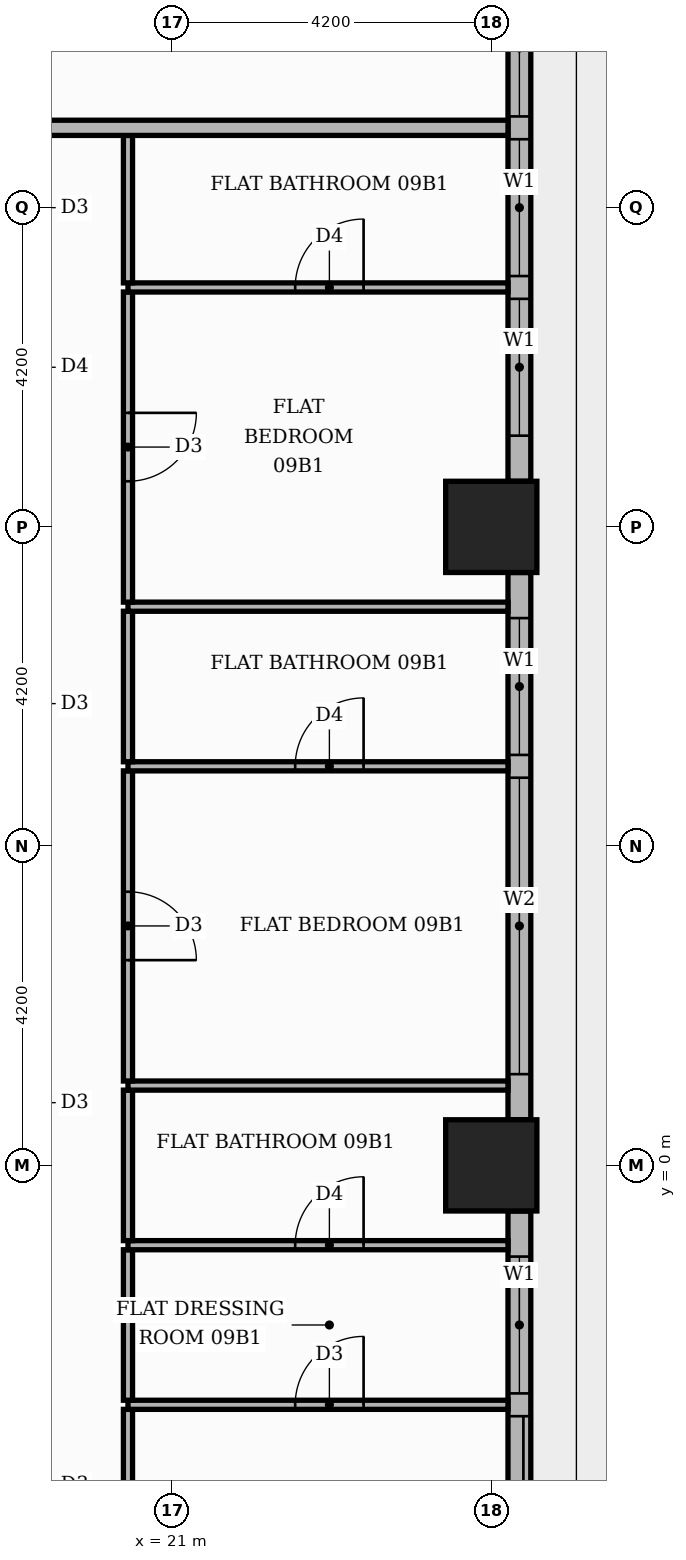
"""IFC4 building model, lengths in metres.
Left out: names, types, materials, properties, quantities, classifications, styles, units other than length and angle.
Written with IfcOpenShell. Run it as: python <this file> out.ifc"""

import sys

from ifc_helpers import new_model, si_unit, direction, frame, frame_2d, origin, origin_2d, place, context, subcontext, project, spatial, rectangle, extrude, element, fill, save


model = new_model("IFC4")
c1 = context("Model", 3, precision=1e-05, world=origin(), true_north=direction((0.0, 1.0)))
c2 = subcontext(c1, "Body", "Model", "MODEL_VIEW")
j1 = project(units=[si_unit("LENGTHUNIT", "METRE"), si_unit("PLANEANGLEUNIT", "RADIAN")], contexts=[c1])
p1 = place(None, origin())
s1 = spatial("IfcSite", under=j1, at=p1, CompositionType="ELEMENT")
p2 = place(p1, origin())
s2 = spatial("IfcBuilding", under=s1, at=p2, CompositionType="ELEMENT")
p3 = place(p2, frame((0.0, 0.0, 42.6)))
s3 = spatial("IfcBuildingStorey", under=s2, at=p3, CompositionType="ELEMENT", Elevation=42.6)
for number, where, z_axis, x_axis in (
    (1, (25.2, 0.0, 0.0), (0.0, 0.0, 1.0), (1.0, 0.0, 0.0)),
    (2, (25.2, 8.4, 0.0), (0.0, 0.0, 1.0), (1.0, 0.0, 0.0)),
):
    element("IfcColumn", number, at=place(p3, frame(where, z_axis=z_axis, x_axis=x_axis)), inside=s3, PredefinedType="COLUMN", context=c2, shape_type="SweptSolid", body=[
        extrude(rectangle(XDim=1.2, YDim=1.2, at=origin_2d()), origin(), (0.0, 0.0, 1.0), 3.9),
    ])
p4 = place(p3, frame((25.57, -7.8, 0.0), z_axis=(0.0, 0.0, 1.0), x_axis=(0.0, 1.0, 0.0)))
e3 = element("IfcWall", 3, at=p4, inside=s3, PredefinedType="STANDARD", context=c2, shape_type="SweptSolid", body=[
    extrude(rectangle(XDim=7.2, YDim=0.3, at=frame_2d((3.6, 0.0))), origin(), (0.0, 0.0, 1.0), 3.48),
])
p5 = place(p4, frame((0.6, 0.0, 0.0)))
e4 = element("IfcOpeningElement", 4, at=p5, cuts=e3, PredefinedType="OPENING", context=c2, shape_type="SweptSolid", body=[
    extrude(rectangle(XDim=3.9, YDim=2.4, at=frame_2d((1.95, 1.2))), frame((0.0, 0.16, 0.0), z_axis=(0.0, -1.0, 0.0), x_axis=(1.0, 0.0, 0.0)), (0.0, 0.0, 1.0), 0.32),
])
p6 = place(p4, frame((4.8, 0.0, 0.9)))
e5 = element("IfcOpeningElement", 5, at=p6, cuts=e3, PredefinedType="OPENING", context=c2, shape_type="SweptSolid", body=[
    extrude(rectangle(XDim=1.8, YDim=2.1, at=frame_2d((0.9, 1.05))), frame((0.0, 0.16, 0.0), z_axis=(0.0, -1.0, 0.0), x_axis=(1.0, 0.0, 0.0)), (0.0, 0.0, 1.0), 0.32),
])
p7 = place(p3, frame((25.57, 0.6, 0.0), z_axis=(0.0, 0.0, 1.0), x_axis=(0.0, 1.0, 0.0)))
e6 = element("IfcWall", 6, at=p7, inside=s3, PredefinedType="STANDARD", context=c2, shape_type="SweptSolid", body=[
    extrude(rectangle(XDim=7.2, YDim=0.3, at=frame_2d((3.6, 0.0))), origin(), (0.0, 0.0, 1.0), 3.48),
])
p8 = place(p7, frame((0.6, 0.0, 0.9)))
e7 = element("IfcOpeningElement", 7, at=p8, cuts=e6, PredefinedType="OPENING", context=c2, shape_type="SweptSolid", body=[
    extrude(rectangle(XDim=3.9, YDim=2.1, at=frame_2d((1.95, 1.05))), frame((0.0, 0.16, 0.0), z_axis=(0.0, -1.0, 0.0), x_axis=(1.0, 0.0, 0.0)), (0.0, 0.0, 1.0), 0.32),
])
p9 = place(p7, frame((4.8, 0.0, 0.9)))
e8 = element("IfcOpeningElement", 8, at=p9, cuts=e6, PredefinedType="OPENING", context=c2, shape_type="SweptSolid", body=[
    extrude(rectangle(XDim=1.8, YDim=2.1, at=frame_2d((0.9, 1.05))), frame((0.0, 0.16, 0.0), z_axis=(0.0, -1.0, 0.0), x_axis=(1.0, 0.0, 0.0)), (0.0, 0.0, 1.0), 0.32),
])
p10 = place(p3, frame((25.57, 9.0, 0.0), z_axis=(0.0, 0.0, 1.0), x_axis=(0.0, 1.0, 0.0)))
e9 = element("IfcWall", 9, at=p10, inside=s3, PredefinedType="STANDARD", context=c2, shape_type="SweptSolid", body=[
    extrude(rectangle(XDim=7.2, YDim=0.3, at=frame_2d((3.6, 0.0))), origin(), (0.0, 0.0, 1.0), 3.48),
])
p11 = place(p10, frame((0.6, 0.0, 0.9)))
e10 = element("IfcOpeningElement", 10, at=p11, cuts=e9, PredefinedType="OPENING", context=c2, shape_type="SweptSolid", body=[
    extrude(rectangle(XDim=1.8, YDim=2.1, at=frame_2d((0.9, 1.05))), frame((0.0, 0.16, 0.0), z_axis=(0.0, -1.0, 0.0), x_axis=(1.0, 0.0, 0.0)), (0.0, 0.0, 1.0), 0.32),
])
p12 = place(p10, frame((2.7, 0.0, 0.9)))
e11 = element("IfcOpeningElement", 11, at=p12, cuts=e9, PredefinedType="OPENING", context=c2, shape_type="SweptSolid", body=[
    extrude(rectangle(XDim=1.8, YDim=2.1, at=frame_2d((0.9, 1.05))), frame((0.0, 0.16, 0.0), z_axis=(0.0, -1.0, 0.0), x_axis=(1.0, 0.0, 0.0)), (0.0, 0.0, 1.0), 0.32),
])
p13 = place(p10, frame((4.8, 0.0, 0.9)))
e12 = element("IfcOpeningElement", 12, at=p13, cuts=e9, PredefinedType="OPENING", context=c2, shape_type="SweptSolid", body=[
    extrude(rectangle(XDim=1.8, YDim=2.1, at=frame_2d((0.9, 1.05))), frame((0.0, 0.16, 0.0), z_axis=(0.0, -1.0, 0.0), x_axis=(1.0, 0.0, 0.0)), (0.0, 0.0, 1.0), 0.32),
])
p14 = place(p3, frame((20.42, -11.49, 0.0), z_axis=(0.0, 0.0, 1.0), x_axis=(0.0, 1.0, 0.0)))
e13 = element("IfcWall", 13, at=p14, inside=s3, PredefinedType="PARTITIONING", context=c2, shape_type="SweptSolid", body=[
    extrude(rectangle(XDim=8.28, YDim=0.12, at=frame_2d((4.14, 0.0))), origin(), (0.0, 0.0, 1.0), 3.48),
])
p15 = place(p14, frame((3.69, 0.0, 0.0)))
e14 = element("IfcOpeningElement", 14, at=p15, cuts=e13, PredefinedType="OPENING", context=c2, shape_type="SweptSolid", body=[
    extrude(rectangle(XDim=0.9, YDim=2.1, at=frame_2d((0.45, 1.05))), frame((0.0, 0.07, 0.0), z_axis=(0.0, -1.0, 0.0), x_axis=(1.0, 0.0, 0.0)), (0.0, 0.0, 1.0), 0.14),
])
p16 = place(p3, frame((20.42, -3.15, 0.0), z_axis=(0.0, 0.0, 1.0), x_axis=(1.0, 0.0, 0.0)))
e15 = element("IfcWall", 15, at=p16, inside=s3, PredefinedType="PARTITIONING", context=c2, shape_type="SweptSolid", body=[
    extrude(rectangle(XDim=5.0, YDim=0.12, at=frame_2d((2.5, 0.0))), origin(), (0.0, 0.0, 1.0), 3.48),
])
p17 = place(p16, frame((2.2, 0.0, 0.0)))
e16 = element("IfcOpeningElement", 16, at=p17, cuts=e15, PredefinedType="OPENING", context=c2, shape_type="SweptSolid", body=[
    extrude(rectangle(XDim=0.9, YDim=2.1, at=frame_2d((0.45, 1.05))), frame((0.0, 0.07, 0.0), z_axis=(0.0, -1.0, 0.0), x_axis=(1.0, 0.0, 0.0)), (0.0, 0.0, 1.0), 0.14),
])
p18 = place(p3, frame((20.42, -3.09, 0.0), z_axis=(0.0, 0.0, 1.0), x_axis=(0.0, 1.0, 0.0)))
e17 = element("IfcWall", 17, at=p18, inside=s3, PredefinedType="PARTITIONING", context=c2, shape_type="SweptSolid", body=[
    extrude(rectangle(XDim=1.98, YDim=0.12, at=frame_2d((0.99, 0.0))), origin(), (0.0, 0.0, 1.0), 3.48),
])
p19 = place(p3, frame((20.42, -1.05, 0.0), z_axis=(0.0, 0.0, 1.0), x_axis=(1.0, 0.0, 0.0)))
e18 = element("IfcWall", 18, at=p19, inside=s3, PredefinedType="PARTITIONING", context=c2, shape_type="SweptSolid", body=[
    extrude(rectangle(XDim=5.0, YDim=0.12, at=frame_2d((2.5, 0.0))), origin(), (0.0, 0.0, 1.0), 3.48),
])
p20 = place(p19, frame((2.2, 0.0, 0.0)))
e19 = element("IfcOpeningElement", 19, at=p20, cuts=e18, PredefinedType="OPENING", context=c2, shape_type="SweptSolid", body=[
    extrude(rectangle(XDim=0.9, YDim=2.1, at=frame_2d((0.45, 1.05))), frame((0.0, 0.07, 0.0), z_axis=(0.0, -1.0, 0.0), x_axis=(1.0, 0.0, 0.0)), (0.0, 0.0, 1.0), 0.14),
])
p21 = place(p3, frame((20.42, -0.99, 0.0), z_axis=(0.0, 0.0, 1.0), x_axis=(0.0, 1.0, 0.0)))
e20 = element("IfcWall", 20, at=p21, inside=s3, PredefinedType="PARTITIONING", context=c2, shape_type="SweptSolid", body=[
    extrude(rectangle(XDim=1.98, YDim=0.12, at=frame_2d((0.99, 0.0))), origin(), (0.0, 0.0, 1.0), 3.48),
])
p22 = place(p3, frame((20.42, 1.05, 0.0), z_axis=(0.0, 0.0, 1.0), x_axis=(1.0, 0.0, 0.0)))
e21 = element("IfcWall", 21, at=p22, inside=s3, PredefinedType="PARTITIONING", context=c2, shape_type="SweptSolid", body=[
    extrude(rectangle(XDim=5.0, YDim=0.12, at=frame_2d((2.5, 0.0))), origin(), (0.0, 0.0, 1.0), 3.48),
])
p23 = place(p3, frame((20.42, 1.11, 0.0), z_axis=(0.0, 0.0, 1.0), x_axis=(0.0, 1.0, 0.0)))
e22 = element("IfcWall", 22, at=p23, inside=s3, PredefinedType="PARTITIONING", context=c2, shape_type="SweptSolid", body=[
    extrude(rectangle(XDim=4.08, YDim=0.12, at=frame_2d((2.04, 0.0))), origin(), (0.0, 0.0, 1.0), 3.48),
])
p24 = place(p23, frame((1.59, 0.0, 0.0)))
e23 = element("IfcOpeningElement", 23, at=p24, cuts=e22, PredefinedType="OPENING", context=c2, shape_type="SweptSolid", body=[
    extrude(rectangle(XDim=0.9, YDim=2.1, at=frame_2d((0.45, 1.05))), frame((0.0, 0.07, 0.0), z_axis=(0.0, -1.0, 0.0), x_axis=(1.0, 0.0, 0.0)), (0.0, 0.0, 1.0), 0.14),
])
p25 = place(p3, frame((20.42, 5.25, 0.0), z_axis=(0.0, 0.0, 1.0), x_axis=(1.0, 0.0, 0.0)))
e24 = element("IfcWall", 24, at=p25, inside=s3, PredefinedType="PARTITIONING", context=c2, shape_type="SweptSolid", body=[
    extrude(rectangle(XDim=5.0, YDim=0.12, at=frame_2d((2.5, 0.0))), origin(), (0.0, 0.0, 1.0), 3.48),
])
p26 = place(p25, frame((2.2, 0.0, 0.0)))
e25 = element("IfcOpeningElement", 25, at=p26, cuts=e24, PredefinedType="OPENING", context=c2, shape_type="SweptSolid", body=[
    extrude(rectangle(XDim=0.9, YDim=2.1, at=frame_2d((0.45, 1.05))), frame((0.0, 0.07, 0.0), z_axis=(0.0, -1.0, 0.0), x_axis=(1.0, 0.0, 0.0)), (0.0, 0.0, 1.0), 0.14),
])
p27 = place(p3, frame((20.42, 5.31, 0.0), z_axis=(0.0, 0.0, 1.0), x_axis=(0.0, 1.0, 0.0)))
e26 = element("IfcWall", 26, at=p27, inside=s3, PredefinedType="PARTITIONING", context=c2, shape_type="SweptSolid", body=[
    extrude(rectangle(XDim=1.98, YDim=0.12, at=frame_2d((0.99, 0.0))), origin(), (0.0, 0.0, 1.0), 3.48),
])
p28 = place(p3, frame((20.42, 7.35, 0.0), z_axis=(0.0, 0.0, 1.0), x_axis=(1.0, 0.0, 0.0)))
e27 = element("IfcWall", 27, at=p28, inside=s3, PredefinedType="PARTITIONING", context=c2, shape_type="SweptSolid", body=[
    extrude(rectangle(XDim=5.0, YDim=0.12, at=frame_2d((2.5, 0.0))), origin(), (0.0, 0.0, 1.0), 3.48),
])
p29 = place(p3, frame((20.42, 7.41, 0.0), z_axis=(0.0, 0.0, 1.0), x_axis=(0.0, 1.0, 0.0)))
e28 = element("IfcWall", 28, at=p29, inside=s3, PredefinedType="PARTITIONING", context=c2, shape_type="SweptSolid", body=[
    extrude(rectangle(XDim=4.08, YDim=0.12, at=frame_2d((2.04, 0.0))), origin(), (0.0, 0.0, 1.0), 3.48),
])
p30 = place(p29, frame((1.59, 0.0, 0.0)))
e29 = element("IfcOpeningElement", 29, at=p30, cuts=e28, PredefinedType="OPENING", context=c2, shape_type="SweptSolid", body=[
    extrude(rectangle(XDim=0.9, YDim=2.1, at=frame_2d((0.45, 1.05))), frame((0.0, 0.07, 0.0), z_axis=(0.0, -1.0, 0.0), x_axis=(1.0, 0.0, 0.0)), (0.0, 0.0, 1.0), 0.14),
])
p31 = place(p3, frame((20.42, 11.55, 0.0), z_axis=(0.0, 0.0, 1.0), x_axis=(1.0, 0.0, 0.0)))
e30 = element("IfcWall", 30, at=p31, inside=s3, PredefinedType="PARTITIONING", context=c2, shape_type="SweptSolid", body=[
    extrude(rectangle(XDim=5.0, YDim=0.12, at=frame_2d((2.5, 0.0))), origin(), (0.0, 0.0, 1.0), 3.48),
])
p32 = place(p31, frame((2.2, 0.0, 0.0)))
e31 = element("IfcOpeningElement", 31, at=p32, cuts=e30, PredefinedType="OPENING", context=c2, shape_type="SweptSolid", body=[
    extrude(rectangle(XDim=0.9, YDim=2.1, at=frame_2d((0.45, 1.05))), frame((0.0, 0.07, 0.0), z_axis=(0.0, -1.0, 0.0), x_axis=(1.0, 0.0, 0.0)), (0.0, 0.0, 1.0), 0.14),
])
p33 = place(p3, frame((20.42, 11.61, 0.0), z_axis=(0.0, 0.0, 1.0), x_axis=(0.0, 1.0, 0.0)))
e32 = element("IfcWall", 32, at=p33, inside=s3, PredefinedType="PARTITIONING", context=c2, shape_type="SweptSolid", body=[
    extrude(rectangle(XDim=1.94, YDim=0.12, at=frame_2d((0.97, 0.0))), origin(), (0.0, 0.0, 1.0), 3.48),
])
p34 = place(p3, frame((-13.65, 13.65, 0.0), z_axis=(0.0, 0.0, 1.0), x_axis=(1.0, 0.0, 0.0)))
e33 = element("IfcWall", 33, at=p34, inside=s3, PredefinedType="PARTITIONING", context=c2, shape_type="SweptSolid", body=[
    extrude(rectangle(XDim=39.07, YDim=0.2, at=frame_2d((19.535, 0.0))), origin(), (0.0, 0.0, 1.0), 3.48),
])
p35 = place(p34, frame((24.65, 0.0, 0.0)))
e34 = element("IfcOpeningElement", 34, at=p35, cuts=e33, PredefinedType="OPENING", context=c2, shape_type="SweptSolid", body=[
    extrude(rectangle(XDim=1.1, YDim=2.4, at=frame_2d((0.55, 1.2))), frame((0.0, 0.11, 0.0), z_axis=(0.0, -1.0, 0.0), x_axis=(1.0, 0.0, 0.0)), (0.0, 0.0, 1.0), 0.22),
])
p36 = place(p34, frame((14.15, 0.0, 0.0)))
e35 = element("IfcOpeningElement", 35, at=p36, cuts=e33, PredefinedType="OPENING", context=c2, shape_type="SweptSolid", body=[
    extrude(rectangle(XDim=1.1, YDim=2.4, at=frame_2d((0.55, 1.2))), frame((0.0, 0.11, 0.0), z_axis=(0.0, -1.0, 0.0), x_axis=(1.0, 0.0, 0.0)), (0.0, 0.0, 1.0), 0.22),
])
p37 = place(p5, origin())
e36 = element("IfcDoor", 36, at=p37, inside=s3, OperationType="SLIDING_TO_LEFT", PredefinedType="DOOR", context=c2, shape_type="SweptSolid", body=[
    extrude(rectangle(XDim=3.9, YDim=2.4, at=frame_2d((1.95, 1.2))), frame((0.0, 0.025, 0.0), z_axis=(0.0, -1.0, 0.0), x_axis=(1.0, 0.0, 0.0)), (0.0, 0.0, 1.0), 0.05),
])
fill(e4, e36)
p38 = place(p6, origin())
e37 = element("IfcWindow", 37, at=p38, inside=s3, PartitioningType="SINGLE_PANEL", PredefinedType="WINDOW", context=c2, shape_type="SweptSolid", body=[
    extrude(rectangle(XDim=1.8, YDim=2.1, at=frame_2d((0.9, 1.05))), frame((0.0, 0.03, 0.0), z_axis=(0.0, -1.0, 0.0), x_axis=(1.0, 0.0, 0.0)), (0.0, 0.0, 1.0), 0.06),
])
fill(e5, e37)
p39 = place(p8, origin())
e38 = element("IfcWindow", 38, at=p39, inside=s3, PartitioningType="SINGLE_PANEL", PredefinedType="WINDOW", context=c2, shape_type="SweptSolid", body=[
    extrude(rectangle(XDim=3.9, YDim=2.1, at=frame_2d((1.95, 1.05))), frame((0.0, 0.03, 0.0), z_axis=(0.0, -1.0, 0.0), x_axis=(1.0, 0.0, 0.0)), (0.0, 0.0, 1.0), 0.06),
])
fill(e7, e38)
p40 = place(p9, origin())
e39 = element("IfcWindow", 39, at=p40, inside=s3, PartitioningType="SINGLE_PANEL", PredefinedType="WINDOW", context=c2, shape_type="SweptSolid", body=[
    extrude(rectangle(XDim=1.8, YDim=2.1, at=frame_2d((0.9, 1.05))), frame((0.0, 0.03, 0.0), z_axis=(0.0, -1.0, 0.0), x_axis=(1.0, 0.0, 0.0)), (0.0, 0.0, 1.0), 0.06),
])
fill(e8, e39)
p41 = place(p11, origin())
e40 = element("IfcWindow", 40, at=p41, inside=s3, PartitioningType="SINGLE_PANEL", PredefinedType="WINDOW", context=c2, shape_type="SweptSolid", body=[
    extrude(rectangle(XDim=1.8, YDim=2.1, at=frame_2d((0.9, 1.05))), frame((0.0, 0.03, 0.0), z_axis=(0.0, -1.0, 0.0), x_axis=(1.0, 0.0, 0.0)), (0.0, 0.0, 1.0), 0.06),
])
fill(e10, e40)
p42 = place(p12, origin())
e41 = element("IfcWindow", 41, at=p42, inside=s3, PartitioningType="SINGLE_PANEL", PredefinedType="WINDOW", context=c2, shape_type="SweptSolid", body=[
    extrude(rectangle(XDim=1.8, YDim=2.1, at=frame_2d((0.9, 1.05))), frame((0.0, 0.03, 0.0), z_axis=(0.0, -1.0, 0.0), x_axis=(1.0, 0.0, 0.0)), (0.0, 0.0, 1.0), 0.06),
])
fill(e11, e41)
p43 = place(p13, origin())
e42 = element("IfcWindow", 42, at=p43, inside=s3, PartitioningType="SINGLE_PANEL", PredefinedType="WINDOW", context=c2, shape_type="SweptSolid", body=[
    extrude(rectangle(XDim=1.8, YDim=2.1, at=frame_2d((0.9, 1.05))), frame((0.0, 0.03, 0.0), z_axis=(0.0, -1.0, 0.0), x_axis=(1.0, 0.0, 0.0)), (0.0, 0.0, 1.0), 0.06),
])
fill(e12, e42)
p44 = place(p17, origin())
e43 = element("IfcDoor", 43, at=p44, inside=s3, OperationType="SINGLE_SWING_RIGHT", PredefinedType="DOOR", context=c2, shape_type="SweptSolid", body=[
    extrude(rectangle(XDim=0.9, YDim=2.1, at=frame_2d((0.45, 1.05))), frame((0.0, 0.025, 0.0), z_axis=(0.0, -1.0, 0.0), x_axis=(1.0, 0.0, 0.0)), (0.0, 0.0, 1.0), 0.05),
])
fill(e16, e43)
p45 = place(p20, origin())
e44 = element("IfcDoor", 44, at=p45, inside=s3, OperationType="SINGLE_SWING_RIGHT", PredefinedType="DOOR", context=c2, shape_type="SweptSolid", body=[
    extrude(rectangle(XDim=0.9, YDim=2.1, at=frame_2d((0.45, 1.05))), frame((0.0, 0.025, 0.0), z_axis=(0.0, -1.0, 0.0), x_axis=(1.0, 0.0, 0.0)), (0.0, 0.0, 1.0), 0.05),
])
fill(e19, e44)
p46 = place(p24, frame((0.9, 0.0, 0.0), z_axis=(0.0, 0.0, 1.0), x_axis=(-1.0, 0.0, 0.0)))
e45 = element("IfcDoor", 45, at=p46, inside=s3, OperationType="SINGLE_SWING_LEFT", PredefinedType="DOOR", context=c2, shape_type="SweptSolid", body=[
    extrude(rectangle(XDim=0.9, YDim=2.1, at=frame_2d((0.45, 1.05))), frame((0.0, 0.025, 0.0), z_axis=(0.0, -1.0, 0.0), x_axis=(1.0, 0.0, 0.0)), (0.0, 0.0, 1.0), 0.05),
])
fill(e23, e45)
p47 = place(p26, origin())
e46 = element("IfcDoor", 46, at=p47, inside=s3, OperationType="SINGLE_SWING_RIGHT", PredefinedType="DOOR", context=c2, shape_type="SweptSolid", body=[
    extrude(rectangle(XDim=0.9, YDim=2.1, at=frame_2d((0.45, 1.05))), frame((0.0, 0.025, 0.0), z_axis=(0.0, -1.0, 0.0), x_axis=(1.0, 0.0, 0.0)), (0.0, 0.0, 1.0), 0.05),
])
fill(e25, e46)
p48 = place(p30, frame((0.9, 0.0, 0.0), z_axis=(0.0, 0.0, 1.0), x_axis=(-1.0, 0.0, 0.0)))
e47 = element("IfcDoor", 47, at=p48, inside=s3, OperationType="SINGLE_SWING_RIGHT", PredefinedType="DOOR", context=c2, shape_type="SweptSolid", body=[
    extrude(rectangle(XDim=0.9, YDim=2.1, at=frame_2d((0.45, 1.05))), frame((0.0, 0.025, 0.0), z_axis=(0.0, -1.0, 0.0), x_axis=(1.0, 0.0, 0.0)), (0.0, 0.0, 1.0), 0.05),
])
fill(e29, e47)
p49 = place(p32, origin())
e48 = element("IfcDoor", 48, at=p49, inside=s3, OperationType="SINGLE_SWING_RIGHT", PredefinedType="DOOR", context=c2, shape_type="SweptSolid", body=[
    extrude(rectangle(XDim=0.9, YDim=2.1, at=frame_2d((0.45, 1.05))), frame((0.0, 0.025, 0.0), z_axis=(0.0, -1.0, 0.0), x_axis=(1.0, 0.0, 0.0)), (0.0, 0.0, 1.0), 0.05),
])
fill(e31, e48)
save(model, sys.argv[1])
